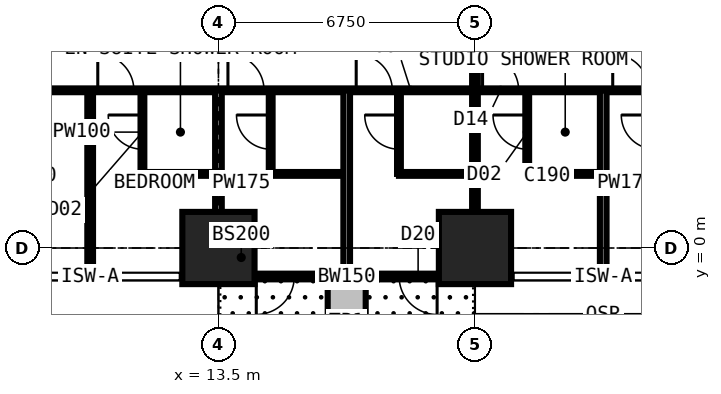
"""IFC4 building model, lengths in metres.
Left out: names, types, materials, properties, quantities, classifications, styles, units other than length and angle.
Written with IfcOpenShell. Run it as: python <this file> out.ifc"""

import sys

from ifc_helpers import new_model, si_unit, direction, frame, frame_2d, origin, origin_2d, place, context, subcontext, project, spatial, rectangle, extrude, element, fill, save


model = new_model("IFC4")
c1 = context("Model", 3, precision=1e-05, world=origin(), true_north=direction((0.0, 1.0)))
c2 = subcontext(c1, "Body", "Model", "MODEL_VIEW")
j1 = project(units=[si_unit("LENGTHUNIT", "METRE"), si_unit("PLANEANGLEUNIT", "RADIAN")], contexts=[c1])
p1 = place(None, origin())
s1 = spatial("IfcSite", under=j1, at=p1, CompositionType="ELEMENT")
p2 = place(p1, origin())
s2 = spatial("IfcBuilding", under=s1, at=p2, CompositionType="ELEMENT")
p3 = place(p2, frame((0.0, 0.0, 39.6)))
s3 = spatial("IfcBuildingStorey", under=s2, at=p3, CompositionType="ELEMENT", Elevation=39.6)
for number, where, z_axis, x_axis in (
    (1, (13.5, 0.0, 0.0), (0.0, 0.0, 1.0), (1.0, 0.0, 0.0)),
    (2, (20.25, 0.0, 0.0), (0.0, 0.0, 1.0), (1.0, 0.0, 0.0)),
):
    element("IfcColumn", number, at=place(p3, frame(where, z_axis=z_axis, x_axis=x_axis)), inside=s3, PredefinedType="COLUMN", context=c2, shape_type="SweptSolid", body=[
        extrude(rectangle(XDim=1.9, YDim=1.9, at=origin_2d()), origin(), (0.0, 0.0, 1.0), 3.6),
    ])
p4 = place(p3, frame((20.25, -0.75, 0.0), z_axis=(0.0, 0.0, 1.0), x_axis=(-1.0, 0.0, 0.0)))
e3 = element("IfcWall", 3, at=p4, inside=s3, PredefinedType="SOLIDWALL", context=c2, shape_type="SweptSolid", body=[
    extrude(rectangle(XDim=6.75, YDim=0.15, at=frame_2d((3.375, 0.0))), origin(), (0.0, 0.0, 1.0), 3.375),
])
p5 = place(p4, frame((0.996, 0.0, 0.0)))
e4 = element("IfcOpeningElement", 4, at=p5, cuts=e3, PredefinedType="OPENING", context=c2, shape_type="SweptSolid", body=[
    extrude(rectangle(XDim=1.0, YDim=2.2, at=frame_2d((0.5, 1.1))), frame((0.0, 0.085, 0.0), z_axis=(0.0, -1.0, 0.0), x_axis=(1.0, 0.0, 0.0)), (0.0, 0.0, 1.0), 0.17),
])
p6 = place(p4, frame((2.042, 0.0, 0.9)))
e5 = element("IfcOpeningElement", 5, at=p6, cuts=e3, PredefinedType="OPENING", context=c2, shape_type="SweptSolid", body=[
    extrude(rectangle(XDim=1.2, YDim=1.8, at=frame_2d((0.6, 0.9))), frame((0.0, 0.085, 0.0), z_axis=(0.0, -1.0, 0.0), x_axis=(1.0, 0.0, 0.0)), (0.0, 0.0, 1.0), 0.17),
])
p7 = place(p4, frame((4.754, 0.0, 0.0)))
e6 = element("IfcOpeningElement", 6, at=p7, cuts=e3, PredefinedType="OPENING", context=c2, shape_type="SweptSolid", body=[
    extrude(rectangle(XDim=1.0, YDim=2.2, at=frame_2d((0.5, 1.1))), frame((0.0, 0.085, 0.0), z_axis=(0.0, -1.0, 0.0), x_axis=(1.0, 0.0, 0.0)), (0.0, 0.0, 1.0), 0.17),
])
p8 = place(p4, frame((3.508, 0.0, 0.9)))
e7 = element("IfcOpeningElement", 7, at=p8, cuts=e3, PredefinedType="OPENING", context=c2, shape_type="SweptSolid", body=[
    extrude(rectangle(XDim=1.2, YDim=1.8, at=frame_2d((0.6, 0.9))), frame((0.0, 0.085, 0.0), z_axis=(0.0, -1.0, 0.0), x_axis=(1.0, 0.0, 0.0)), (0.0, 0.0, 1.0), 0.17),
])
p9 = place(p3, frame((16.875, -0.85, 0.0), z_axis=(0.0, 0.0, 1.0), x_axis=(0.0, -1.0, 0.0)))
e8 = element("IfcWall", 8, at=p9, inside=s3, PredefinedType="USERDEFINED", context=c2, shape_type="SweptSolid", body=[
    extrude(rectangle(XDim=2.2, YDim=1.0, at=frame_2d((1.1, 0.0))), origin(), (0.0, 0.0, 1.0), 0.9),
])
p10 = place(p3, frame((6.75, 4.15, 0.0), z_axis=(0.0, 0.0, 1.0), x_axis=(1.0, 0.0, 0.0)))
e9 = element("IfcWall", 9, at=p10, inside=s3, PredefinedType="PARTITIONING", context=c2, shape_type="SweptSolid", body=[
    extrude(rectangle(XDim=23.625, YDim=0.1, at=frame_2d((11.812, 0.0))), origin(), (0.0, 0.0, 1.0), 3.375),
])
p11 = place(p10, frame((1.2, 0.0, 0.0)))
e10 = element("IfcOpeningElement", 10, at=p11, cuts=e9, PredefinedType="OPENING", context=c2, shape_type="SweptSolid", body=[
    extrude(rectangle(XDim=1.0, YDim=2.2, at=frame_2d((0.5, 1.1))), frame((0.0, 0.06, 0.0), z_axis=(0.0, -1.0, 0.0), x_axis=(1.0, 0.0, 0.0)), (0.0, 0.0, 1.0), 0.12),
])
p12 = place(p10, frame((3.575, 0.0, 0.0)))
e11 = element("IfcOpeningElement", 11, at=p12, cuts=e9, PredefinedType="OPENING", context=c2, shape_type="SweptSolid", body=[
    extrude(rectangle(XDim=0.95, YDim=2.2, at=frame_2d((0.475, 1.1))), frame((0.0, 0.06, 0.0), z_axis=(0.0, -1.0, 0.0), x_axis=(1.0, 0.0, 0.0)), (0.0, 0.0, 1.0), 0.12),
])
p13 = place(p10, frame((7.0, 0.0, 0.0)))
e12 = element("IfcOpeningElement", 12, at=p13, cuts=e9, PredefinedType="OPENING", context=c2, shape_type="SweptSolid", body=[
    extrude(rectangle(XDim=0.95, YDim=2.2, at=frame_2d((0.475, 1.1))), frame((0.0, 0.06, 0.0), z_axis=(0.0, -1.0, 0.0), x_axis=(1.0, 0.0, 0.0)), (0.0, 0.0, 1.0), 0.12),
])
p14 = place(p10, frame((10.375, 0.0, 0.0)))
e13 = element("IfcOpeningElement", 13, at=p14, cuts=e9, PredefinedType="OPENING", context=c2, shape_type="SweptSolid", body=[
    extrude(rectangle(XDim=0.95, YDim=2.2, at=frame_2d((0.475, 1.1))), frame((0.0, 0.06, 0.0), z_axis=(0.0, -1.0, 0.0), x_axis=(1.0, 0.0, 0.0)), (0.0, 0.0, 1.0), 0.12),
])
p15 = place(p10, frame((13.7, 0.0, 0.0)))
e14 = element("IfcOpeningElement", 14, at=p15, cuts=e9, PredefinedType="OPENING", context=c2, shape_type="SweptSolid", body=[
    extrude(rectangle(XDim=0.95, YDim=2.2, at=frame_2d((0.475, 1.1))), frame((0.0, 0.06, 0.0), z_axis=(0.0, -1.0, 0.0), x_axis=(1.0, 0.0, 0.0)), (0.0, 0.0, 1.0), 0.12),
])
p16 = place(p10, frame((17.125, 0.0, 0.0)))
e15 = element("IfcOpeningElement", 15, at=p16, cuts=e9, PredefinedType="OPENING", context=c2, shape_type="SweptSolid", body=[
    extrude(rectangle(XDim=0.95, YDim=2.2, at=frame_2d((0.475, 1.1))), frame((0.0, 0.06, 0.0), z_axis=(0.0, -1.0, 0.0), x_axis=(1.0, 0.0, 0.0)), (0.0, 0.0, 1.0), 0.12),
])
p17 = place(p10, frame((20.5, 0.0, 0.0)))
e16 = element("IfcOpeningElement", 16, at=p17, cuts=e9, PredefinedType="OPENING", context=c2, shape_type="SweptSolid", body=[
    extrude(rectangle(XDim=0.95, YDim=2.2, at=frame_2d((0.475, 1.1))), frame((0.0, 0.06, 0.0), z_axis=(0.0, -1.0, 0.0), x_axis=(1.0, 0.0, 0.0)), (0.0, 0.0, 1.0), 0.12),
])
p18 = place(p3, frame((10.125, -0.734, 0.0), z_axis=(0.0, 0.0, 1.0), x_axis=(0.0, 1.0, 0.0)))
e17 = element("IfcWall", 17, at=p18, inside=s3, PredefinedType="PARTITIONING", context=c2, shape_type="SweptSolid", body=[
    extrude(rectangle(XDim=4.884, YDim=0.15, at=frame_2d((2.442, 0.0))), origin(), (0.0, 0.0, 1.0), 3.375),
])
p19 = place(p3, frame((11.5, 1.95, 0.0), z_axis=(0.0, 0.0, 1.0), x_axis=(0.0, 1.0, 0.0)))
e18 = element("IfcWall", 18, at=p19, inside=s3, PredefinedType="PARTITIONING", context=c2, shape_type="SweptSolid", body=[
    extrude(rectangle(XDim=2.2, YDim=0.1, at=frame_2d((1.1, 0.0))), origin(), (0.0, 0.0, 1.0), 3.375),
])
p20 = place(p19, frame((0.65, 0.0, 0.0)))
e19 = element("IfcOpeningElement", 19, at=p20, cuts=e18, PredefinedType="OPENING", context=c2, shape_type="SweptSolid", body=[
    extrude(rectangle(XDim=0.9, YDim=2.2, at=frame_2d((0.45, 1.1))), frame((0.0, 0.06, 0.0), z_axis=(0.0, -1.0, 0.0), x_axis=(1.0, 0.0, 0.0)), (0.0, 0.0, 1.0), 0.12),
])
p21 = place(p3, frame((11.5, 1.95, 0.0), z_axis=(0.0, 0.0, 1.0), x_axis=(1.0, 0.0, 0.0)))
e20 = element("IfcWall", 20, at=p21, inside=s3, PredefinedType="PARTITIONING", context=c2, shape_type="SweptSolid", body=[
    extrude(rectangle(XDim=2.0, YDim=0.1, at=frame_2d((1.0, 0.0))), origin(), (0.0, 0.0, 1.0), 3.375),
])
p22 = place(p3, frame((13.5, -0.734, 0.0), z_axis=(0.0, 0.0, 1.0), x_axis=(0.0, 1.0, 0.0)))
e21 = element("IfcWall", 21, at=p22, inside=s3, PredefinedType="PARTITIONING", context=c2, shape_type="SweptSolid", body=[
    extrude(rectangle(XDim=4.884, YDim=0.175, at=frame_2d((2.442, 0.0))), origin(), (0.0, 0.0, 1.0), 2.877),
])
p23 = place(p3, frame((14.875, 1.95, 0.0), z_axis=(0.0, 0.0, 1.0), x_axis=(0.0, 1.0, 0.0)))
e22 = element("IfcWall", 22, at=p23, inside=s3, PredefinedType="PARTITIONING", context=c2, shape_type="SweptSolid", body=[
    extrude(rectangle(XDim=2.2, YDim=0.1, at=frame_2d((1.1, 0.0))), origin(), (0.0, 0.0, 1.0), 3.375),
])
p24 = place(p23, frame((0.65, 0.0, 0.0)))
e23 = element("IfcOpeningElement", 23, at=p24, cuts=e22, PredefinedType="OPENING", context=c2, shape_type="SweptSolid", body=[
    extrude(rectangle(XDim=0.9, YDim=2.2, at=frame_2d((0.45, 1.1))), frame((0.0, 0.06, 0.0), z_axis=(0.0, -1.0, 0.0), x_axis=(1.0, 0.0, 0.0)), (0.0, 0.0, 1.0), 0.12),
])
p25 = place(p3, frame((14.875, 1.95, 0.0), z_axis=(0.0, 0.0, 1.0), x_axis=(1.0, 0.0, 0.0)))
e24 = element("IfcWall", 24, at=p25, inside=s3, PredefinedType="PARTITIONING", context=c2, shape_type="SweptSolid", body=[
    extrude(rectangle(XDim=2.0, YDim=0.1, at=frame_2d((1.0, 0.0))), origin(), (0.0, 0.0, 1.0), 3.375),
])
p26 = place(p3, frame((16.875, -0.734, 0.0), z_axis=(0.0, 0.0, 1.0), x_axis=(0.0, 1.0, 0.0)))
e25 = element("IfcWall", 25, at=p26, inside=s3, PredefinedType="PARTITIONING", context=c2, shape_type="SweptSolid", body=[
    extrude(rectangle(XDim=4.884, YDim=0.175, at=frame_2d((2.442, 0.0))), origin(), (0.0, 0.0, 1.0), 3.375),
])
p27 = place(p3, frame((18.25, 1.95, 0.0), z_axis=(0.0, 0.0, 1.0), x_axis=(0.0, 1.0, 0.0)))
e26 = element("IfcWall", 26, at=p27, inside=s3, PredefinedType="PARTITIONING", context=c2, shape_type="SweptSolid", body=[
    extrude(rectangle(XDim=2.2, YDim=0.1, at=frame_2d((1.1, 0.0))), origin(), (0.0, 0.0, 1.0), 3.375),
])
p28 = place(p27, frame((0.65, 0.0, 0.0)))
e27 = element("IfcOpeningElement", 27, at=p28, cuts=e26, PredefinedType="OPENING", context=c2, shape_type="SweptSolid", body=[
    extrude(rectangle(XDim=0.9, YDim=2.2, at=frame_2d((0.45, 1.1))), frame((0.0, 0.06, 0.0), z_axis=(0.0, -1.0, 0.0), x_axis=(1.0, 0.0, 0.0)), (0.0, 0.0, 1.0), 0.12),
])
p29 = place(p3, frame((18.25, 1.95, 0.0), z_axis=(0.0, 0.0, 1.0), x_axis=(1.0, 0.0, 0.0)))
e28 = element("IfcWall", 28, at=p29, inside=s3, PredefinedType="PARTITIONING", context=c2, shape_type="SweptSolid", body=[
    extrude(rectangle(XDim=2.0, YDim=0.1, at=frame_2d((1.0, 0.0))), origin(), (0.0, 0.0, 1.0), 3.375),
])
p30 = place(p3, frame((20.25, -0.734, 0.0), z_axis=(0.0, 0.0, 1.0), x_axis=(0.0, 1.0, 0.0)))
e29 = element("IfcWall", 29, at=p30, inside=s3, PredefinedType="PARTITIONING", context=c2, shape_type="SweptSolid", body=[
    extrude(rectangle(XDim=12.034, YDim=0.15, at=frame_2d((6.017, 0.0))), origin(), (0.0, 0.0, 1.0), 2.61),
])
p31 = place(p3, frame((21.625, 1.95, 0.0), z_axis=(0.0, 0.0, 1.0), x_axis=(0.0, 1.0, 0.0)))
e30 = element("IfcWall", 30, at=p31, inside=s3, PredefinedType="PARTITIONING", context=c2, shape_type="SweptSolid", body=[
    extrude(rectangle(XDim=2.2, YDim=0.1, at=frame_2d((1.1, 0.0))), origin(), (0.0, 0.0, 1.0), 3.375),
])
p32 = place(p31, frame((0.65, 0.0, 0.0)))
e31 = element("IfcOpeningElement", 31, at=p32, cuts=e30, PredefinedType="OPENING", context=c2, shape_type="SweptSolid", body=[
    extrude(rectangle(XDim=0.9, YDim=2.2, at=frame_2d((0.45, 1.1))), frame((0.0, 0.06, 0.0), z_axis=(0.0, -1.0, 0.0), x_axis=(1.0, 0.0, 0.0)), (0.0, 0.0, 1.0), 0.12),
])
p33 = place(p3, frame((21.625, 1.95, 0.0), z_axis=(0.0, 0.0, 1.0), x_axis=(1.0, 0.0, 0.0)))
e32 = element("IfcWall", 32, at=p33, inside=s3, PredefinedType="PARTITIONING", context=c2, shape_type="SweptSolid", body=[
    extrude(rectangle(XDim=2.0, YDim=0.1, at=frame_2d((1.0, 0.0))), origin(), (0.0, 0.0, 1.0), 3.375),
])
p34 = place(p3, frame((23.625, -0.734, 0.0), z_axis=(0.0, 0.0, 1.0), x_axis=(0.0, 1.0, 0.0)))
e33 = element("IfcWall", 33, at=p34, inside=s3, PredefinedType="PARTITIONING", context=c2, shape_type="SweptSolid", body=[
    extrude(rectangle(XDim=4.884, YDim=0.175, at=frame_2d((2.442, 0.0))), origin(), (0.0, 0.0, 1.0), 3.375),
])
p35 = place(p5, origin())
e34 = element("IfcDoor", 34, at=p35, inside=s3, OperationType="SINGLE_SWING_LEFT", PredefinedType="DOOR", context=c2, shape_type="SweptSolid", body=[
    extrude(rectangle(XDim=1.0, YDim=2.2, at=frame_2d((0.5, 1.1))), frame((0.0, 0.025, 0.0), z_axis=(0.0, -1.0, 0.0), x_axis=(1.0, 0.0, 0.0)), (0.0, 0.0, 1.0), 0.05),
])
fill(e4, e34)
p36 = place(p6, origin())
e35 = element("IfcWindow", 35, at=p36, inside=s3, PartitioningType="SINGLE_PANEL", PredefinedType="WINDOW", context=c2, shape_type="SweptSolid", body=[
    extrude(rectangle(XDim=1.2, YDim=1.8, at=frame_2d((0.6, 0.9))), frame((0.0, 0.03, 0.0), z_axis=(0.0, -1.0, 0.0), x_axis=(1.0, 0.0, 0.0)), (0.0, 0.0, 1.0), 0.06),
])
fill(e5, e35)
p37 = place(p7, origin())
e36 = element("IfcDoor", 36, at=p37, inside=s3, OperationType="SINGLE_SWING_RIGHT", PredefinedType="DOOR", context=c2, shape_type="SweptSolid", body=[
    extrude(rectangle(XDim=1.0, YDim=2.2, at=frame_2d((0.5, 1.1))), frame((0.0, 0.025, 0.0), z_axis=(0.0, -1.0, 0.0), x_axis=(1.0, 0.0, 0.0)), (0.0, 0.0, 1.0), 0.05),
])
fill(e6, e36)
p38 = place(p8, origin())
e37 = element("IfcWindow", 37, at=p38, inside=s3, PartitioningType="SINGLE_PANEL", PredefinedType="WINDOW", context=c2, shape_type="SweptSolid", body=[
    extrude(rectangle(XDim=1.2, YDim=1.8, at=frame_2d((0.6, 0.9))), frame((0.0, 0.03, 0.0), z_axis=(0.0, -1.0, 0.0), x_axis=(1.0, 0.0, 0.0)), (0.0, 0.0, 1.0), 0.06),
])
fill(e7, e37)
p39 = place(p12, origin())
e38 = element("IfcDoor", 38, at=p39, inside=s3, OperationType="SINGLE_SWING_LEFT", PredefinedType="DOOR", context=c2, shape_type="SweptSolid", body=[
    extrude(rectangle(XDim=0.95, YDim=2.2, at=frame_2d((0.475, 1.1))), frame((0.0, 0.025, 0.0), z_axis=(0.0, -1.0, 0.0), x_axis=(1.0, 0.0, 0.0)), (0.0, 0.0, 1.0), 0.05),
])
fill(e11, e38)
p40 = place(p20, origin())
e39 = element("IfcDoor", 39, at=p40, inside=s3, OperationType="SINGLE_SWING_RIGHT", PredefinedType="DOOR", context=c2, shape_type="SweptSolid", body=[
    extrude(rectangle(XDim=0.9, YDim=2.2, at=frame_2d((0.45, 1.1))), frame((0.0, 0.025, 0.0), z_axis=(0.0, -1.0, 0.0), x_axis=(1.0, 0.0, 0.0)), (0.0, 0.0, 1.0), 0.05),
])
fill(e19, e39)
p41 = place(p13, origin())
e40 = element("IfcDoor", 40, at=p41, inside=s3, OperationType="SINGLE_SWING_LEFT", PredefinedType="DOOR", context=c2, shape_type="SweptSolid", body=[
    extrude(rectangle(XDim=0.95, YDim=2.2, at=frame_2d((0.475, 1.1))), frame((0.0, 0.025, 0.0), z_axis=(0.0, -1.0, 0.0), x_axis=(1.0, 0.0, 0.0)), (0.0, 0.0, 1.0), 0.05),
])
fill(e12, e40)
p42 = place(p24, origin())
e41 = element("IfcDoor", 41, at=p42, inside=s3, OperationType="SINGLE_SWING_RIGHT", PredefinedType="DOOR", context=c2, shape_type="SweptSolid", body=[
    extrude(rectangle(XDim=0.9, YDim=2.2, at=frame_2d((0.45, 1.1))), frame((0.0, 0.025, 0.0), z_axis=(0.0, -1.0, 0.0), x_axis=(1.0, 0.0, 0.0)), (0.0, 0.0, 1.0), 0.05),
])
fill(e23, e41)
p43 = place(p14, origin())
e42 = element("IfcDoor", 42, at=p43, inside=s3, OperationType="SINGLE_SWING_LEFT", PredefinedType="DOOR", context=c2, shape_type="SweptSolid", body=[
    extrude(rectangle(XDim=0.95, YDim=2.2, at=frame_2d((0.475, 1.1))), frame((0.0, 0.025, 0.0), z_axis=(0.0, -1.0, 0.0), x_axis=(1.0, 0.0, 0.0)), (0.0, 0.0, 1.0), 0.05),
])
fill(e13, e42)
p44 = place(p28, origin())
e43 = element("IfcDoor", 43, at=p44, inside=s3, OperationType="SINGLE_SWING_RIGHT", PredefinedType="DOOR", context=c2, shape_type="SweptSolid", body=[
    extrude(rectangle(XDim=0.9, YDim=2.2, at=frame_2d((0.45, 1.1))), frame((0.0, 0.025, 0.0), z_axis=(0.0, -1.0, 0.0), x_axis=(1.0, 0.0, 0.0)), (0.0, 0.0, 1.0), 0.05),
])
fill(e27, e43)
p45 = place(p15, origin())
e44 = element("IfcDoor", 44, at=p45, inside=s3, OperationType="SINGLE_SWING_LEFT", PredefinedType="DOOR", context=c2, shape_type="SweptSolid", body=[
    extrude(rectangle(XDim=0.95, YDim=2.2, at=frame_2d((0.475, 1.1))), frame((0.0, 0.025, 0.0), z_axis=(0.0, -1.0, 0.0), x_axis=(1.0, 0.0, 0.0)), (0.0, 0.0, 1.0), 0.05),
])
fill(e14, e44)
p46 = place(p32, origin())
e45 = element("IfcDoor", 45, at=p46, inside=s3, OperationType="SINGLE_SWING_RIGHT", PredefinedType="DOOR", context=c2, shape_type="SweptSolid", body=[
    extrude(rectangle(XDim=0.9, YDim=2.2, at=frame_2d((0.45, 1.1))), frame((0.0, 0.025, 0.0), z_axis=(0.0, -1.0, 0.0), x_axis=(1.0, 0.0, 0.0)), (0.0, 0.0, 1.0), 0.05),
])
fill(e31, e45)
p47 = place(p16, origin())
e46 = element("IfcDoor", 46, at=p47, inside=s3, OperationType="SINGLE_SWING_LEFT", PredefinedType="DOOR", context=c2, shape_type="SweptSolid", body=[
    extrude(rectangle(XDim=0.95, YDim=2.2, at=frame_2d((0.475, 1.1))), frame((0.0, 0.025, 0.0), z_axis=(0.0, -1.0, 0.0), x_axis=(1.0, 0.0, 0.0)), (0.0, 0.0, 1.0), 0.05),
])
fill(e15, e46)
save(model, sys.argv[1])
